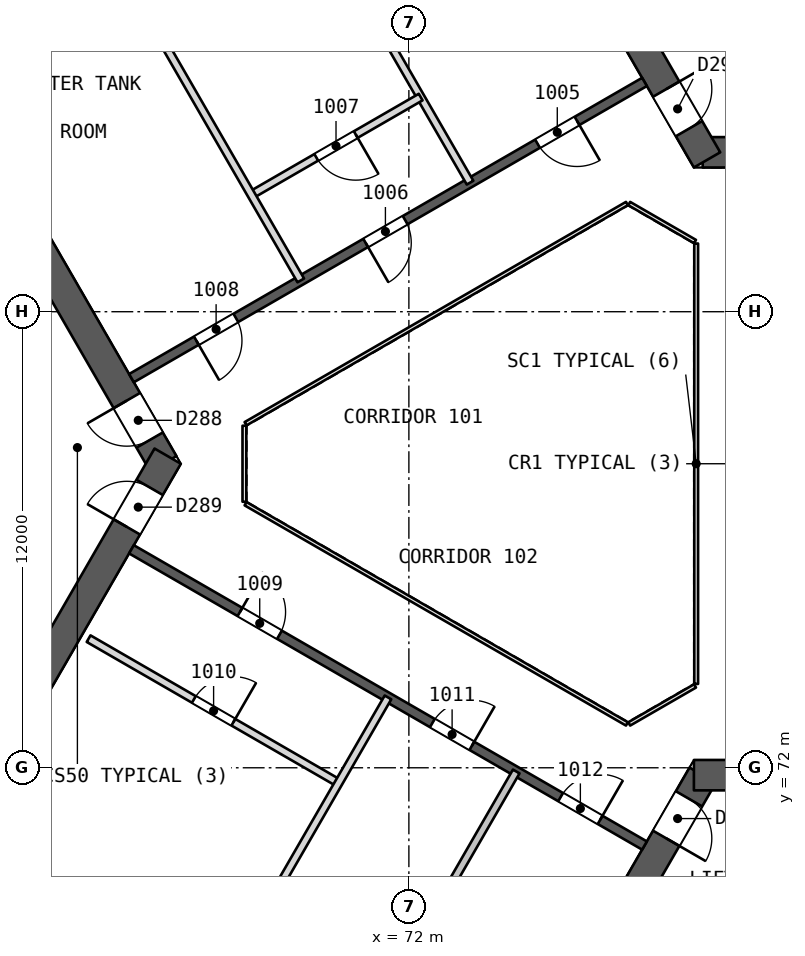
"""IFC4 building model, lengths in metres.
Left out: names, types, materials, properties, quantities, classifications, styles, units other than length and angle.
Written with IfcOpenShell. Run it as: python <this file> out.ifc"""

import sys

from ifc_helpers import new_model, si_unit, direction, frame, frame_2d, origin, place, context, subcontext, project, spatial, rectangle, extrude, element, fill, save


model = new_model("IFC4")
c1 = context("Model", 3, precision=1e-05, world=origin(), true_north=direction((0.0, 1.0)))
c2 = subcontext(c1, "Body", "Model", "MODEL_VIEW")
j1 = project(units=[si_unit("LENGTHUNIT", "METRE"), si_unit("PLANEANGLEUNIT", "RADIAN")], contexts=[c1])
p1 = place(None, origin())
s1 = spatial("IfcSite", under=j1, at=p1, CompositionType="ELEMENT")
p2 = place(p1, origin())
s2 = spatial("IfcBuilding", under=s1, at=p2, CompositionType="ELEMENT")
p3 = place(p2, frame((0.0, 0.0, 48.5)))
s3 = spatial("IfcBuildingStorey", under=s2, at=p3, CompositionType="ELEMENT", Elevation=48.5)
p4 = place(p3, frame((65.538, 80.0, 0.0), z_axis=(0.0, 0.0, 1.0), x_axis=(-0.49999662545, 0.866027352073, 0.0)))
e1 = element("IfcWall", 1, at=p4, inside=s3, PredefinedType="SHEAR", context=c2, shape_type="SweptSolid", body=[
    extrude(rectangle(XDim=10.149, YDim=0.8, at=frame_2d((5.074, 0.0))), origin(), (0.0, 0.0, 1.0), 4.4),
])
p5 = place(p4, frame((0.719, 0.0, 0.0)))
e2 = element("IfcOpeningElement", 2, at=p5, cuts=e1, PredefinedType="OPENING", context=c2, shape_type="SweptSolid", body=[
    extrude(rectangle(XDim=1.2, YDim=2.1, at=frame_2d((0.6, 1.05))), frame((0.0, 0.411, 0.0), z_axis=(0.0, -1.0, 0.0), x_axis=(1.0, 0.0, 0.0)), (0.0, 0.0, 1.0), 0.821),
])
p6 = place(p3, frame((60.664, 71.557, 0.0), z_axis=(0.0, 0.0, 1.0), x_axis=(0.50000409368, 0.866023040284, 0.0)))
e3 = element("IfcWall", 3, at=p6, inside=s3, PredefinedType="SHEAR", context=c2, shape_type="SweptSolid", body=[
    extrude(rectangle(XDim=9.98, YDim=0.8, at=frame_2d((4.99, 0.0))), origin(), (0.0, 0.0, 1.0), 4.4),
])
p7 = place(p6, frame((7.83, 0.0, 0.0)))
e4 = element("IfcOpeningElement", 4, at=p7, cuts=e3, PredefinedType="OPENING", context=c2, shape_type="SweptSolid", body=[
    extrude(rectangle(XDim=1.2, YDim=2.1, at=frame_2d((0.6, 1.05))), frame((0.0, 0.411, 0.0), z_axis=(0.0, -1.0, 0.0), x_axis=(1.0, 0.0, 0.0)), (0.0, 0.0, 1.0), 0.821),
])
p8 = place(p3, frame((79.731, 88.194, 0.0), z_axis=(0.0, 0.0, 1.0), x_axis=(1.0, 0.0, 0.0)))
e5 = element("IfcWall", 5, at=p8, inside=s3, PredefinedType="SHEAR", context=c2, shape_type="SweptSolid", body=[
    extrude(rectangle(XDim=10.149, YDim=0.8, at=frame_2d((5.074, 0.0))), origin(), (0.0, 0.0, 1.0), 4.4),
])
p9 = place(p8, frame((0.719, 0.0, 0.0)))
e6 = element("IfcOpeningElement", 6, at=p9, cuts=e5, PredefinedType="OPENING", context=c2, shape_type="SweptSolid", body=[
    extrude(rectangle(XDim=1.2, YDim=2.1, at=frame_2d((0.6, 1.05))), frame((0.0, 0.411, 0.0), z_axis=(0.0, -1.0, 0.0), x_axis=(1.0, 0.0, 0.0)), (0.0, 0.0, 1.0), 0.821),
])
p10 = place(p3, frame((74.856, 96.637, 0.0), z_axis=(0.0, 0.0, 1.0), x_axis=(0.499993500917, -0.866029155999, 0.0)))
e7 = element("IfcWall", 7, at=p10, inside=s3, PredefinedType="SHEAR", context=c2, shape_type="SweptSolid", body=[
    extrude(rectangle(XDim=9.98, YDim=0.8, at=frame_2d((4.99, 0.0))), origin(), (0.0, 0.0, 1.0), 4.4),
])
p11 = place(p10, frame((7.83, 0.0, 0.0)))
e8 = element("IfcOpeningElement", 8, at=p11, cuts=e7, PredefinedType="OPENING", context=c2, shape_type="SweptSolid", body=[
    extrude(rectangle(XDim=1.2, YDim=2.1, at=frame_2d((0.6, 1.05))), frame((0.0, 0.411, 0.0), z_axis=(0.0, -1.0, 0.0), x_axis=(1.0, 0.0, 0.0)), (0.0, 0.0, 1.0), 0.821),
])
p12 = place(p3, frame((79.731, 71.806, 0.0), z_axis=(0.0, 0.0, 1.0), x_axis=(-0.49999662545, -0.866027352073, 0.0)))
e9 = element("IfcWall", 9, at=p12, inside=s3, PredefinedType="SHEAR", context=c2, shape_type="SweptSolid", body=[
    extrude(rectangle(XDim=10.149, YDim=0.8, at=frame_2d((5.074, 0.0))), origin(), (0.0, 0.0, 1.0), 4.4),
])
p13 = place(p12, frame((0.719, 0.0, 0.0)))
e10 = element("IfcOpeningElement", 10, at=p13, cuts=e9, PredefinedType="OPENING", context=c2, shape_type="SweptSolid", body=[
    extrude(rectangle(XDim=1.2, YDim=2.1, at=frame_2d((0.6, 1.05))), frame((0.0, 0.411, 0.0), z_axis=(0.0, -1.0, 0.0), x_axis=(1.0, 0.0, 0.0)), (0.0, 0.0, 1.0), 0.821),
])
p14 = place(p3, frame((89.48, 71.806, 0.0), z_axis=(0.0, 0.0, 1.0), x_axis=(-1.0, 0.0, 0.0)))
e11 = element("IfcWall", 11, at=p14, inside=s3, PredefinedType="SHEAR", context=c2, shape_type="SweptSolid", body=[
    extrude(rectangle(XDim=9.98, YDim=0.8, at=frame_2d((4.99, 0.0))), origin(), (0.0, 0.0, 1.0), 4.4),
])
p15 = place(p14, frame((7.83, 0.0, 0.0)))
e12 = element("IfcOpeningElement", 12, at=p15, cuts=e11, PredefinedType="OPENING", context=c2, shape_type="SweptSolid", body=[
    extrude(rectangle(XDim=1.2, YDim=2.1, at=frame_2d((0.6, 1.05))), frame((0.0, 0.411, 0.0), z_axis=(0.0, -1.0, 0.0), x_axis=(1.0, 0.0, 0.0)), (0.0, 0.0, 1.0), 0.821),
])
p16 = place(p3, frame((78.2, 90.046, 0.0), z_axis=(0.0, 0.0, 1.0), x_axis=(-0.866026492143, -0.499998114903, 0.0)))
e13 = element("IfcWall", 13, at=p16, inside=s3, PredefinedType="SHEAR", context=c2, shape_type="SweptSolid", body=[
    extrude(rectangle(XDim=15.588, YDim=0.25, at=frame_2d((7.794, 0.0))), origin(), (0.0, 0.0, 1.0), 3.9),
])
p17 = place(p16, frame((2.05, 0.0, 0.0)))
e14 = element("IfcOpeningElement", 14, at=p17, cuts=e13, PredefinedType="OPENING", context=c2, shape_type="SweptSolid", body=[
    extrude(rectangle(XDim=1.2, YDim=2.4, at=frame_2d((0.6, 1.2))), frame((0.0, 0.135, 0.0), z_axis=(0.0, -1.0, 0.0), x_axis=(1.0, 0.0, 0.0)), (0.0, 0.0, 1.0), 0.271),
])
p18 = place(p16, frame((7.272, 0.0, 0.0)))
e15 = element("IfcOpeningElement", 15, at=p18, cuts=e13, PredefinedType="OPENING", context=c2, shape_type="SweptSolid", body=[
    extrude(rectangle(XDim=1.2, YDim=2.4, at=frame_2d((0.6, 1.2))), frame((0.0, 0.135, 0.0), z_axis=(0.0, -1.0, 0.0), x_axis=(1.0, 0.0, 0.0)), (0.0, 0.0, 1.0), 0.271),
])
p19 = place(p16, frame((12.417, 0.0, 0.0)))
e16 = element("IfcOpeningElement", 16, at=p19, cuts=e13, PredefinedType="OPENING", context=c2, shape_type="SweptSolid", body=[
    extrude(rectangle(XDim=1.2, YDim=2.4, at=frame_2d((0.6, 1.2))), frame((0.0, 0.135, 0.0), z_axis=(0.0, -1.0, 0.0), x_axis=(1.0, 0.0, 0.0)), (0.0, 0.0, 1.0), 0.271),
])
p20 = place(p3, frame((64.7, 77.748, 0.0), z_axis=(0.0, 0.0, 1.0), x_axis=(0.866026492143, -0.499998114903, 0.0)))
e17 = element("IfcWall", 17, at=p20, inside=s3, PredefinedType="SHEAR", context=c2, shape_type="SweptSolid", body=[
    extrude(rectangle(XDim=15.588, YDim=0.25, at=frame_2d((7.794, 0.0))), origin(), (0.0, 0.0, 1.0), 3.9),
])
p21 = place(p20, frame((3.297, 0.0, 0.0)))
e18 = element("IfcOpeningElement", 18, at=p21, cuts=e17, PredefinedType="OPENING", context=c2, shape_type="SweptSolid", body=[
    extrude(rectangle(XDim=1.2, YDim=2.4, at=frame_2d((0.6, 1.2))), frame((0.0, 0.135, 0.0), z_axis=(0.0, -1.0, 0.0), x_axis=(1.0, 0.0, 0.0)), (0.0, 0.0, 1.0), 0.271),
])
p22 = place(p20, frame((9.143, 0.0, 0.0)))
e19 = element("IfcOpeningElement", 19, at=p22, cuts=e17, PredefinedType="OPENING", context=c2, shape_type="SweptSolid", body=[
    extrude(rectangle(XDim=1.2, YDim=2.4, at=frame_2d((0.6, 1.2))), frame((0.0, 0.135, 0.0), z_axis=(0.0, -1.0, 0.0), x_axis=(1.0, 0.0, 0.0)), (0.0, 0.0, 1.0), 0.271),
])
p23 = place(p20, frame((13.04, 0.0, 0.0)))
e20 = element("IfcOpeningElement", 20, at=p23, cuts=e17, PredefinedType="OPENING", context=c2, shape_type="SweptSolid", body=[
    extrude(rectangle(XDim=1.2, YDim=2.4, at=frame_2d((0.6, 1.2))), frame((0.0, 0.135, 0.0), z_axis=(0.0, -1.0, 0.0), x_axis=(1.0, 0.0, 0.0)), (0.0, 0.0, 1.0), 0.271),
])
p24 = place(p3, frame((66.671, 99.414, 0.0), z_axis=(0.0, 0.0, 1.0), x_axis=(0.500010269051, -0.866019474864, 0.0)))
e21 = element("IfcWall", 21, at=p24, inside=s3, PredefinedType="PARTITIONING", context=c2, shape_type="SweptSolid", body=[
    extrude(rectangle(XDim=13.878, YDim=0.2, at=frame_2d((6.939, 0.0))), origin(), (0.0, 0.0, 1.0), 3.9),
])
p25 = place(p3, frame((72.31, 89.647, 0.0), z_axis=(0.0, 0.0, 1.0), x_axis=(-0.866035426308, -0.499982640079, 0.0)))
e22 = element("IfcWall", 22, at=p25, inside=s3, PredefinedType="PARTITIONING", context=c2, shape_type="SweptSolid", body=[
    extrude(rectangle(XDim=5.144, YDim=0.2, at=frame_2d((2.572, 0.0))), origin(), (0.0, 0.0, 1.0), 3.9),
])
p26 = place(p25, frame((1.972, 0.0, 0.0)))
e23 = element("IfcOpeningElement", 23, at=p26, cuts=e22, PredefinedType="OPENING", context=c2, shape_type="SweptSolid", body=[
    extrude(rectangle(XDim=1.2, YDim=2.4, at=frame_2d((0.6, 1.2))), frame((0.0, 0.11, 0.0), z_axis=(0.0, -1.0, 0.0), x_axis=(1.0, 0.0, 0.0)), (0.0, 0.0, 1.0), 0.221),
])
p27 = place(p3, frame((62.216, 96.842, 0.0), z_axis=(0.0, 0.0, 1.0), x_axis=(0.499997074782, -0.866027092653, 0.0)))
e24 = element("IfcWall", 24, at=p27, inside=s3, PredefinedType="PARTITIONING", context=c2, shape_type="SweptSolid", body=[
    extrude(rectangle(XDim=13.877, YDim=0.2, at=frame_2d((6.939, 0.0))), origin(), (0.0, 0.0, 1.0), 3.9),
])
p28 = place(p3, frame((63.572, 75.397, 0.0), z_axis=(0.0, 0.0, 1.0), x_axis=(0.866024999478, -0.500000700278, 0.0)))
e25 = element("IfcWall", 25, at=p28, inside=s3, PredefinedType="PARTITIONING", context=c2, shape_type="SweptSolid", body=[
    extrude(rectangle(XDim=7.595, YDim=0.2, at=frame_2d((3.798, 0.0))), origin(), (0.0, 0.0, 1.0), 3.9),
])
p29 = place(p28, frame((3.198, 0.0, 0.0)))
e26 = element("IfcOpeningElement", 26, at=p29, cuts=e25, PredefinedType="OPENING", context=c2, shape_type="SweptSolid", body=[
    extrude(rectangle(XDim=1.2, YDim=2.4, at=frame_2d((0.6, 1.2))), frame((0.0, 0.11, 0.0), z_axis=(0.0, -1.0, 0.0), x_axis=(1.0, 0.0, 0.0)), (0.0, 0.0, 1.0), 0.221),
])
for number, where, z_axis, x_axis in (
    (27, (64.511, 61.833, 0.0), (0.0, 0.0, 1.0), (0.5, 0.866, 0.0)),
    (28, (67.886, 59.884, 0.0), (0.0, 0.0, 1.0), (0.5, 0.866, 0.0)),
):
    element("IfcWall", number, at=place(p3, frame(where, z_axis=z_axis, x_axis=x_axis)), inside=s3, PredefinedType="PARTITIONING", context=c2, shape_type="SweptSolid", body=[
        extrude(rectangle(XDim=13.877, YDim=0.2, at=frame_2d((6.939, 0.0))), origin(), (0.0, 0.0, 1.0), 3.9),
    ])
p30 = place(p3, frame((38.131, 83.108, 0.0), z_axis=(0.0, 0.0, 1.0), x_axis=(0.866025105017, 0.50000051748, 0.0)))
e29 = element("IfcWall", 29, at=p30, inside=s3, PredefinedType="SOLIDWALL", context=c2, shape_type="SweptSolid", body=[
    extrude(rectangle(XDim=60.751, YDim=0.3, at=frame_2d((30.375, 0.0))), origin(), (0.0, 0.0, 1.0), 3.9),
])
p31 = place(p30, frame((3.562, 0.0, 0.6)))
e30 = element("IfcOpeningElement", 30, at=p31, cuts=e29, PredefinedType="OPENING", context=c2, shape_type="SweptSolid", body=[
    extrude(rectangle(XDim=3.0, YDim=2.4, at=frame_2d((1.5, 1.2))), frame((0.0, 0.161, 0.0), z_axis=(0.0, -1.0, 0.0), x_axis=(1.0, 0.0, 0.0)), (0.0, 0.0, 1.0), 0.321),
])
p32 = place(p30, frame((13.688, 0.0, 0.6)))
e31 = element("IfcOpeningElement", 31, at=p32, cuts=e29, PredefinedType="OPENING", context=c2, shape_type="SweptSolid", body=[
    extrude(rectangle(XDim=3.0, YDim=2.4, at=frame_2d((1.5, 1.2))), frame((0.0, 0.161, 0.0), z_axis=(0.0, -1.0, 0.0), x_axis=(1.0, 0.0, 0.0)), (0.0, 0.0, 1.0), 0.321),
])
p33 = place(p30, frame((23.813, 0.0, 0.6)))
e32 = element("IfcOpeningElement", 32, at=p33, cuts=e29, PredefinedType="OPENING", context=c2, shape_type="SweptSolid", body=[
    extrude(rectangle(XDim=3.0, YDim=2.4, at=frame_2d((1.5, 1.2))), frame((0.0, 0.161, 0.0), z_axis=(0.0, -1.0, 0.0), x_axis=(1.0, 0.0, 0.0)), (0.0, 0.0, 1.0), 0.321),
])
p34 = place(p30, frame((33.938, 0.0, 0.6)))
e33 = element("IfcOpeningElement", 33, at=p34, cuts=e29, PredefinedType="OPENING", context=c2, shape_type="SweptSolid", body=[
    extrude(rectangle(XDim=3.0, YDim=2.4, at=frame_2d((1.5, 1.2))), frame((0.0, 0.161, 0.0), z_axis=(0.0, -1.0, 0.0), x_axis=(1.0, 0.0, 0.0)), (0.0, 0.0, 1.0), 0.321),
])
p35 = place(p30, frame((44.063, 0.0, 0.6)))
e34 = element("IfcOpeningElement", 34, at=p35, cuts=e29, PredefinedType="OPENING", context=c2, shape_type="SweptSolid", body=[
    extrude(rectangle(XDim=3.0, YDim=2.4, at=frame_2d((1.5, 1.2))), frame((0.0, 0.161, 0.0), z_axis=(0.0, -1.0, 0.0), x_axis=(1.0, 0.0, 0.0)), (0.0, 0.0, 1.0), 0.321),
])
p36 = place(p30, frame((54.188, 0.0, 0.6)))
e35 = element("IfcOpeningElement", 35, at=p36, cuts=e29, PredefinedType="OPENING", context=c2, shape_type="SweptSolid", body=[
    extrude(rectangle(XDim=3.0, YDim=2.4, at=frame_2d((1.5, 1.2))), frame((0.0, 0.161, 0.0), z_axis=(0.0, -1.0, 0.0), x_axis=(1.0, 0.0, 0.0)), (0.0, 0.0, 1.0), 0.321),
])
p37 = place(p3, frame((90.743, 46.516, 0.0), z_axis=(0.0, 0.0, 1.0), x_axis=(-0.866025105017, 0.50000051748, 0.0)))
e36 = element("IfcWall", 36, at=p37, inside=s3, PredefinedType="SOLIDWALL", context=c2, shape_type="SweptSolid", body=[
    extrude(rectangle(XDim=60.751, YDim=0.3, at=frame_2d((30.375, 0.0))), origin(), (0.0, 0.0, 1.0), 3.9),
])
p38 = place(p37, frame((3.562, 0.0, 0.6)))
e37 = element("IfcOpeningElement", 37, at=p38, cuts=e36, PredefinedType="OPENING", context=c2, shape_type="SweptSolid", body=[
    extrude(rectangle(XDim=3.0, YDim=2.4, at=frame_2d((1.5, 1.2))), frame((0.0, 0.161, 0.0), z_axis=(0.0, -1.0, 0.0), x_axis=(1.0, 0.0, 0.0)), (0.0, 0.0, 1.0), 0.321),
])
p39 = place(p37, frame((13.688, 0.0, 0.6)))
e38 = element("IfcOpeningElement", 38, at=p39, cuts=e36, PredefinedType="OPENING", context=c2, shape_type="SweptSolid", body=[
    extrude(rectangle(XDim=3.0, YDim=2.4, at=frame_2d((1.5, 1.2))), frame((0.0, 0.161, 0.0), z_axis=(0.0, -1.0, 0.0), x_axis=(1.0, 0.0, 0.0)), (0.0, 0.0, 1.0), 0.321),
])
p40 = place(p37, frame((23.813, 0.0, 0.6)))
e39 = element("IfcOpeningElement", 39, at=p40, cuts=e36, PredefinedType="OPENING", context=c2, shape_type="SweptSolid", body=[
    extrude(rectangle(XDim=3.0, YDim=2.4, at=frame_2d((1.5, 1.2))), frame((0.0, 0.161, 0.0), z_axis=(0.0, -1.0, 0.0), x_axis=(1.0, 0.0, 0.0)), (0.0, 0.0, 1.0), 0.321),
])
p41 = place(p37, frame((33.938, 0.0, 0.6)))
e40 = element("IfcOpeningElement", 40, at=p41, cuts=e36, PredefinedType="OPENING", context=c2, shape_type="SweptSolid", body=[
    extrude(rectangle(XDim=3.0, YDim=2.4, at=frame_2d((1.5, 1.2))), frame((0.0, 0.161, 0.0), z_axis=(0.0, -1.0, 0.0), x_axis=(1.0, 0.0, 0.0)), (0.0, 0.0, 1.0), 0.321),
])
p42 = place(p37, frame((44.063, 0.0, 0.6)))
e41 = element("IfcOpeningElement", 41, at=p42, cuts=e36, PredefinedType="OPENING", context=c2, shape_type="SweptSolid", body=[
    extrude(rectangle(XDim=3.0, YDim=2.4, at=frame_2d((1.5, 1.2))), frame((0.0, 0.161, 0.0), z_axis=(0.0, -1.0, 0.0), x_axis=(1.0, 0.0, 0.0)), (0.0, 0.0, 1.0), 0.321),
])
p43 = place(p37, frame((54.188, 0.0, 0.6)))
e42 = element("IfcOpeningElement", 42, at=p43, cuts=e36, PredefinedType="OPENING", context=c2, shape_type="SweptSolid", body=[
    extrude(rectangle(XDim=3.0, YDim=2.4, at=frame_2d((1.5, 1.2))), frame((0.0, 0.161, 0.0), z_axis=(0.0, -1.0, 0.0), x_axis=(1.0, 0.0, 0.0)), (0.0, 0.0, 1.0), 0.321),
])
p44 = place(p3, frame((86.77, 89.486, 0.0), z_axis=(0.0, 0.0, 1.0), x_axis=(-0.86601811187, 0.500012629753, 0.0)))
e43 = element("IfcWall", 43, at=p44, inside=s3, PredefinedType="SOLIDWALL", context=c2, shape_type="SweptSolid", body=[
    extrude(rectangle(XDim=10.9, YDim=0.2, at=frame_2d((5.45, 0.0))), origin(), (0.0, 0.0, 1.0), 3.9),
])
p45 = place(p3, frame((77.135, 64.952, 0.0), z_axis=(0.0, 0.0, 1.0), x_axis=(0.866031916153, 0.499988720078, 0.0)))
e44 = element("IfcWall", 44, at=p45, inside=s3, PredefinedType="SOLIDWALL", context=c2, shape_type="SweptSolid", body=[
    extrude(rectangle(XDim=11.35, YDim=0.2, at=frame_2d((5.675, 0.0))), origin(), (0.0, 0.0, 1.0), 3.9),
])
p46 = place(p3, frame((79.56, 74.206, 0.0), z_axis=(0.0, 0.0, 1.0), x_axis=(0.0, 1.0, 0.0)))
e45 = element("IfcWall", 45, at=p46, inside=s3, PredefinedType="PARTITIONING", context=c2, shape_type="SweptSolid", body=[
    extrude(rectangle(XDim=11.588, YDim=0.1, at=frame_2d((5.794, 0.0))), origin(), (0.0, 0.0, 1.0), 3.9),
])
p47 = place(p3, frame((79.53, 85.846, 0.0), z_axis=(0.0, 0.0, 1.0), x_axis=(-0.866041268327, 0.499972520799, 0.0)))
e46 = element("IfcWall", 46, at=p47, inside=s3, PredefinedType="PARTITIONING", context=c2, shape_type="SweptSolid", body=[
    extrude(rectangle(XDim=2.0, YDim=0.1, at=frame_2d((1.0, 0.0))), origin(), (0.0, 0.0, 1.0), 3.9),
])
p48 = place(p3, frame((77.738, 86.846, 0.0), z_axis=(0.0, 0.0, 1.0), x_axis=(-0.866026658274, -0.499997827154, 0.0)))
e47 = element("IfcWall", 47, at=p48, inside=s3, PredefinedType="PARTITIONING", context=c2, shape_type="SweptSolid", body=[
    extrude(rectangle(XDim=11.588, YDim=0.1, at=frame_2d((5.794, 0.0))), origin(), (0.0, 0.0, 1.0), 3.9),
])
p49 = place(p3, frame((67.672, 81.0, 0.0), z_axis=(0.0, 0.0, 1.0), x_axis=(0.0, -1.0, 0.0)))
e48 = element("IfcWall", 48, at=p49, inside=s3, PredefinedType="PARTITIONING", context=c2, shape_type="SweptSolid", body=[
    extrude(rectangle(XDim=2.0, YDim=0.1, at=frame_2d((1.0, 0.0))), origin(), (0.0, 0.0, 1.0), 3.9),
])
p50 = place(p3, frame((67.702, 78.948, 0.0), z_axis=(0.0, 0.0, 1.0), x_axis=(0.866026658274, -0.499997827154, 0.0)))
e49 = element("IfcWall", 49, at=p50, inside=s3, PredefinedType="PARTITIONING", context=c2, shape_type="SweptSolid", body=[
    extrude(rectangle(XDim=11.588, YDim=0.1, at=frame_2d((5.794, 0.0))), origin(), (0.0, 0.0, 1.0), 3.9),
])
p51 = place(p3, frame((77.798, 73.154, 0.0), z_axis=(0.0, 0.0, 1.0), x_axis=(0.866041268327, 0.499972520799, 0.0)))
e50 = element("IfcWall", 50, at=p51, inside=s3, PredefinedType="PARTITIONING", context=c2, shape_type="SweptSolid", body=[
    extrude(rectangle(XDim=2.0, YDim=0.1, at=frame_2d((1.0, 0.0))), origin(), (0.0, 0.0, 1.0), 3.9),
])
p52 = place(p17, origin())
e51 = element("IfcDoor", 51, at=p52, inside=s3, OperationType="SINGLE_SWING_LEFT", PredefinedType="NOTDEFINED", context=c2, shape_type="SweptSolid", body=[
    extrude(rectangle(XDim=1.2, YDim=2.4, at=frame_2d((0.6, 1.2))), frame((0.0, 0.025, 0.0), z_axis=(0.0, -1.0, 0.0), x_axis=(1.0, 0.0, 0.0)), (0.0, 0.0, 1.0), 0.05),
])
fill(e14, e51)
p53 = place(p18, origin())
e52 = element("IfcDoor", 52, at=p53, inside=s3, OperationType="SINGLE_SWING_RIGHT", PredefinedType="NOTDEFINED", context=c2, shape_type="SweptSolid", body=[
    extrude(rectangle(XDim=1.2, YDim=2.4, at=frame_2d((0.6, 1.2))), frame((0.0, 0.025, 0.0), z_axis=(0.0, -1.0, 0.0), x_axis=(1.0, 0.0, 0.0)), (0.0, 0.0, 1.0), 0.05),
])
fill(e15, e52)
p54 = place(p26, origin())
e53 = element("IfcDoor", 53, at=p54, inside=s3, OperationType="SINGLE_SWING_LEFT", PredefinedType="NOTDEFINED", context=c2, shape_type="SweptSolid", body=[
    extrude(rectangle(XDim=1.2, YDim=2.4, at=frame_2d((0.6, 1.2))), frame((0.0, 0.025, 0.0), z_axis=(0.0, -1.0, 0.0), x_axis=(1.0, 0.0, 0.0)), (0.0, 0.0, 1.0), 0.05),
])
fill(e23, e53)
p55 = place(p19, origin())
e54 = element("IfcDoor", 54, at=p55, inside=s3, OperationType="SINGLE_SWING_RIGHT", PredefinedType="NOTDEFINED", context=c2, shape_type="SweptSolid", body=[
    extrude(rectangle(XDim=1.2, YDim=2.4, at=frame_2d((0.6, 1.2))), frame((0.0, 0.025, 0.0), z_axis=(0.0, -1.0, 0.0), x_axis=(1.0, 0.0, 0.0)), (0.0, 0.0, 1.0), 0.05),
])
fill(e16, e54)
p56 = place(p21, origin())
e55 = element("IfcDoor", 55, at=p56, inside=s3, OperationType="SINGLE_SWING_LEFT", PredefinedType="NOTDEFINED", context=c2, shape_type="SweptSolid", body=[
    extrude(rectangle(XDim=1.2, YDim=2.4, at=frame_2d((0.6, 1.2))), frame((0.0, 0.025, 0.0), z_axis=(0.0, -1.0, 0.0), x_axis=(1.0, 0.0, 0.0)), (0.0, 0.0, 1.0), 0.05),
])
fill(e18, e55)
p57 = place(p29, origin())
e56 = element("IfcDoor", 56, at=p57, inside=s3, OperationType="SINGLE_SWING_RIGHT", PredefinedType="NOTDEFINED", context=c2, shape_type="SweptSolid", body=[
    extrude(rectangle(XDim=1.2, YDim=2.4, at=frame_2d((0.6, 1.2))), frame((0.0, 0.025, 0.0), z_axis=(0.0, -1.0, 0.0), x_axis=(1.0, 0.0, 0.0)), (0.0, 0.0, 1.0), 0.05),
])
fill(e26, e56)
p58 = place(p22, origin())
e57 = element("IfcDoor", 57, at=p58, inside=s3, OperationType="SINGLE_SWING_RIGHT", PredefinedType="NOTDEFINED", context=c2, shape_type="SweptSolid", body=[
    extrude(rectangle(XDim=1.2, YDim=2.4, at=frame_2d((0.6, 1.2))), frame((0.0, 0.025, 0.0), z_axis=(0.0, -1.0, 0.0), x_axis=(1.0, 0.0, 0.0)), (0.0, 0.0, 1.0), 0.05),
])
fill(e19, e57)
p59 = place(p23, origin())
e58 = element("IfcDoor", 58, at=p59, inside=s3, OperationType="SINGLE_SWING_RIGHT", PredefinedType="NOTDEFINED", context=c2, shape_type="SweptSolid", body=[
    extrude(rectangle(XDim=1.2, YDim=2.4, at=frame_2d((0.6, 1.2))), frame((0.0, 0.025, 0.0), z_axis=(0.0, -1.0, 0.0), x_axis=(1.0, 0.0, 0.0)), (0.0, 0.0, 1.0), 0.05),
])
fill(e20, e58)
p60 = place(p5, origin())
e59 = element("IfcDoor", 59, at=p60, inside=s3, OperationType="SINGLE_SWING_RIGHT", PredefinedType="NOTDEFINED", context=c2, shape_type="SweptSolid", body=[
    extrude(rectangle(XDim=1.2, YDim=2.1, at=frame_2d((0.6, 1.05))), frame((0.0, 0.025, 0.0), z_axis=(0.0, -1.0, 0.0), x_axis=(1.0, 0.0, 0.0)), (0.0, 0.0, 1.0), 0.05),
])
fill(e2, e59)
p61 = place(p7, origin())
e60 = element("IfcDoor", 60, at=p61, inside=s3, OperationType="SINGLE_SWING_LEFT", PredefinedType="NOTDEFINED", context=c2, shape_type="SweptSolid", body=[
    extrude(rectangle(XDim=1.2, YDim=2.1, at=frame_2d((0.6, 1.05))), frame((0.0, 0.025, 0.0), z_axis=(0.0, -1.0, 0.0), x_axis=(1.0, 0.0, 0.0)), (0.0, 0.0, 1.0), 0.05),
])
fill(e4, e60)
p62 = place(p11, origin())
e61 = element("IfcDoor", 61, at=p62, inside=s3, OperationType="SINGLE_SWING_LEFT", PredefinedType="NOTDEFINED", context=c2, shape_type="SweptSolid", body=[
    extrude(rectangle(XDim=1.2, YDim=2.1, at=frame_2d((0.6, 1.05))), frame((0.0, 0.025, 0.0), z_axis=(0.0, -1.0, 0.0), x_axis=(1.0, 0.0, 0.0)), (0.0, 0.0, 1.0), 0.05),
])
fill(e8, e61)
p63 = place(p13, origin())
e62 = element("IfcDoor", 62, at=p63, inside=s3, OperationType="SINGLE_SWING_RIGHT", PredefinedType="NOTDEFINED", context=c2, shape_type="SweptSolid", body=[
    extrude(rectangle(XDim=1.2, YDim=2.1, at=frame_2d((0.6, 1.05))), frame((0.0, 0.025, 0.0), z_axis=(0.0, -1.0, 0.0), x_axis=(1.0, 0.0, 0.0)), (0.0, 0.0, 1.0), 0.05),
])
fill(e10, e62)
save(model, sys.argv[1])
